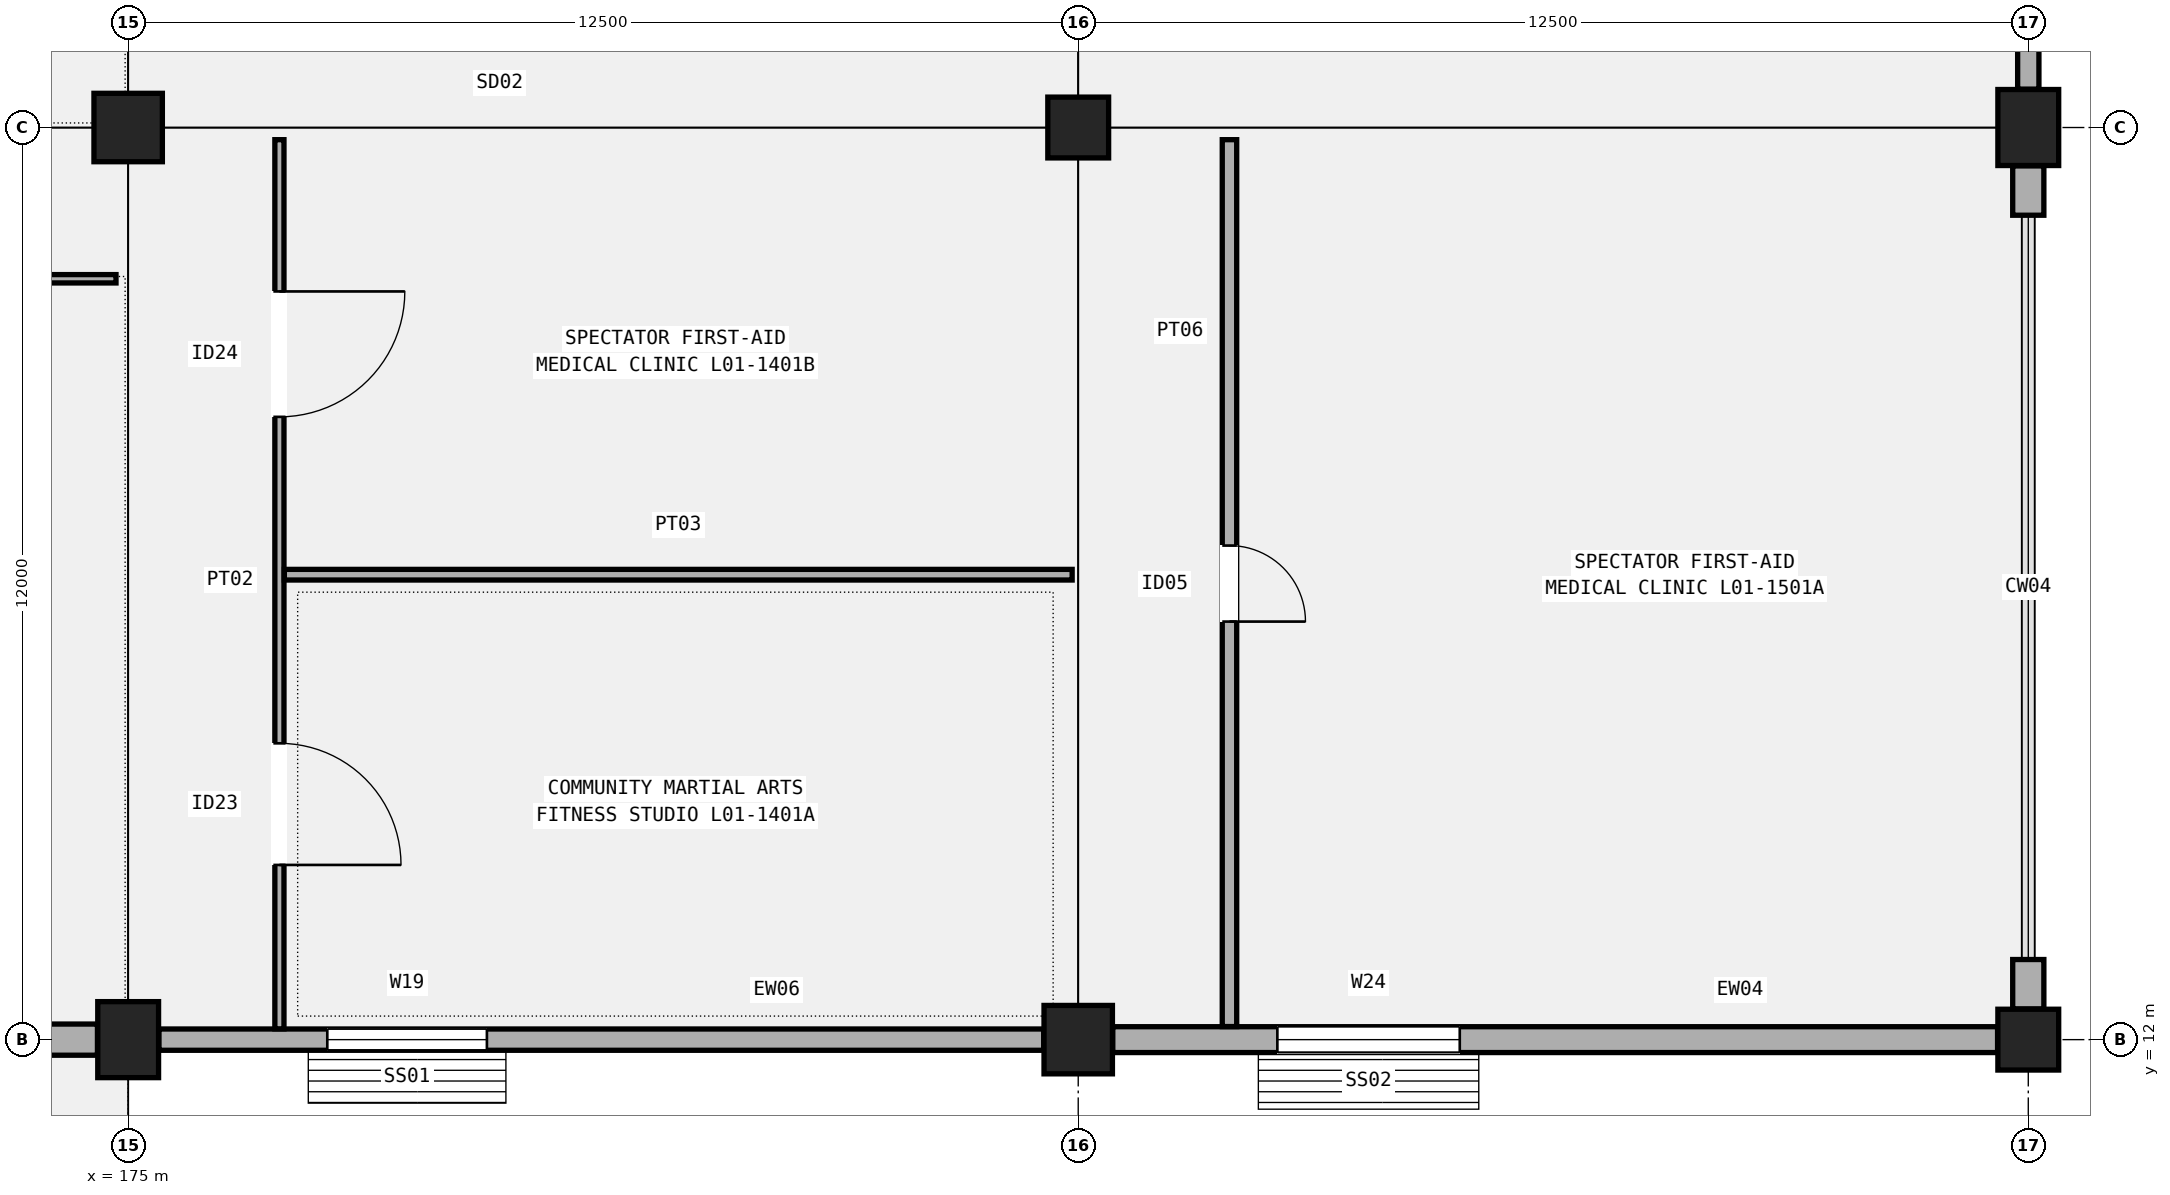
"""IFC4 building model, lengths in metres.
Left out: names, types, materials, properties, quantities, classifications, styles, units other than length and angle.
Written with IfcOpenShell. Run it as: python <this file> out.ifc"""

import sys

from ifc_helpers import new_model, si_unit, direction, frame, frame_2d, origin, origin_2d, place, context, subcontext, project, spatial, rectangle, extrude, element, fill, save


model = new_model("IFC4")
c1 = context("Model", 3, precision=1e-05, world=origin(), true_north=direction((0.0, 1.0)))
c2 = subcontext(c1, "Body", "Model", "MODEL_VIEW")
j1 = project(units=[si_unit("LENGTHUNIT", "METRE"), si_unit("PLANEANGLEUNIT", "RADIAN")], contexts=[c1])
p1 = place(None, origin())
s1 = spatial("IfcSite", under=j1, at=p1, CompositionType="ELEMENT")
p2 = place(p1, origin())
s2 = spatial("IfcBuilding", under=s1, at=p2, CompositionType="ELEMENT")
p3 = place(p2, frame((0.0, 0.0, 5.4)))
s3 = spatial("IfcBuildingStorey", under=s2, at=p3, CompositionType="ELEMENT", Elevation=5.4)
p4 = place(p3, frame((175.0, 12.0, 0.0), z_axis=(0.0, 0.0, 1.0), x_axis=(1.0, 0.0, 0.0)))
e1 = element("IfcColumn", 1, at=p4, inside=s3, PredefinedType="COLUMN", context=c2, shape_type="SweptSolid", body=[
    extrude(rectangle(XDim=0.8, YDim=1.0, at=origin_2d()), origin(), (0.0, 0.0, 1.0), 4.8),
])
for number, where, z_axis, x_axis in (
    (2, (175.0, 24.0, 0.0), (0.0, 0.0, 1.0), (1.0, 0.0, 0.0)),
    (3, (187.5, 12.0, 0.0), (0.0, 0.0, 1.0), (1.0, 0.0, 0.0)),
):
    element("IfcColumn", number, at=place(p3, frame(where, z_axis=z_axis, x_axis=x_axis)), inside=s3, PredefinedType="COLUMN", context=c2, shape_type="SweptSolid", body=[
        extrude(rectangle(XDim=0.9, YDim=0.9, at=origin_2d()), origin(), (0.0, 0.0, 1.0), 4.8),
    ])
for number, where, z_axis, x_axis in (
    (4, (187.5, 24.0, 0.0), (0.0, 0.0, 1.0), (1.0, 0.0, 0.0)),
    (5, (200.0, 12.0, 0.0), (0.0, 0.0, 1.0), (1.0, 0.0, 0.0)),
):
    element("IfcColumn", number, at=place(p3, frame(where, z_axis=z_axis, x_axis=x_axis)), inside=s3, PredefinedType="COLUMN", context=c2, shape_type="SweptSolid", body=[
        extrude(rectangle(XDim=0.8, YDim=0.8, at=origin_2d()), origin(), (0.0, 0.0, 1.0), 4.8),
    ])
p5 = place(p3, frame((200.0, 24.0, 0.0), z_axis=(0.0, 0.0, 1.0), x_axis=(1.0, 0.0, 0.0)))
e6 = element("IfcColumn", 6, at=p5, inside=s3, PredefinedType="COLUMN", context=c2, shape_type="SweptSolid", body=[
    extrude(rectangle(XDim=0.8, YDim=1.0, at=origin_2d()), origin(), (0.0, 0.0, 1.0), 4.8),
])
p6 = place(p3, frame((173.946, 12.0, 0.0), z_axis=(0.0, 0.0, 1.0), x_axis=(1.0, 0.0, 0.0)))
e7 = element("IfcWall", 7, at=p6, inside=s3, PredefinedType="SOLIDWALL", context=c2, shape_type="SweptSolid", body=[
    extrude(rectangle(XDim=0.65, YDim=0.41, at=frame_2d((0.325, 0.0))), origin(), (0.0, 0.0, 1.0), 4.15),
])
p7 = place(p3, frame((175.404, 12.0, 0.0), z_axis=(0.0, 0.0, 1.0), x_axis=(1.0, 0.0, 0.0)))
e8 = element("IfcWall", 8, at=p7, inside=s3, PredefinedType="SOLIDWALL", context=c2, shape_type="SweptSolid", body=[
    extrude(rectangle(XDim=11.642, YDim=0.28, at=frame_2d((5.821, 0.0))), origin(), (0.0, 0.0, 1.0), 4.2),
])
p8 = place(p7, frame((2.216, 0.0, 0.95)))
e9 = element("IfcOpeningElement", 9, at=p8, cuts=e8, PredefinedType="OPENING", context=c2, shape_type="SweptSolid", body=[
    extrude(rectangle(XDim=2.1, YDim=2.25, at=frame_2d((1.05, 1.125))), frame((0.0, 0.15, 0.0), z_axis=(0.0, -1.0, 0.0), x_axis=(1.0, 0.0, 0.0)), (0.0, 0.0, 1.0), 0.3),
])
p9 = place(p3, frame((187.954, 12.0, 0.0), z_axis=(0.0, 0.0, 1.0), x_axis=(1.0, 0.0, 0.0)))
e10 = element("IfcWall", 10, at=p9, inside=s3, PredefinedType="SOLIDWALL", context=c2, shape_type="SweptSolid", body=[
    extrude(rectangle(XDim=11.642, YDim=0.34, at=frame_2d((5.821, 0.0))), origin(), (0.0, 0.0, 1.0), 4.15),
])
p10 = place(p9, frame((2.166, 0.0, 0.95)))
e11 = element("IfcOpeningElement", 11, at=p10, cuts=e10, PredefinedType="OPENING", context=c2, shape_type="SweptSolid", body=[
    extrude(rectangle(XDim=2.4, YDim=2.05, at=frame_2d((1.2, 1.025))), frame((0.0, 0.18, 0.0), z_axis=(0.0, -1.0, 0.0), x_axis=(1.0, 0.0, 0.0)), (0.0, 0.0, 1.0), 0.36),
])
p11 = place(p3, frame((200.0, 12.404, 0.0), z_axis=(0.0, 0.0, 1.0), x_axis=(0.0, 1.0, 0.0)))
e12 = element("IfcWall", 12, at=p11, inside=s3, PredefinedType="SOLIDWALL", context=c2, shape_type="SweptSolid", body=[
    extrude(rectangle(XDim=0.65, YDim=0.41, at=frame_2d((0.325, 0.0))), origin(), (0.0, 0.0, 1.0), 4.2),
])
p12 = place(p3, frame((200.0, 22.846, 0.0), z_axis=(0.0, 0.0, 1.0), x_axis=(0.0, 1.0, 0.0)))
e13 = element("IfcWall", 13, at=p12, inside=s3, PredefinedType="SOLIDWALL", context=c2, shape_type="SweptSolid", body=[
    extrude(rectangle(XDim=0.65, YDim=0.41, at=frame_2d((0.325, 0.0))), origin(), (0.0, 0.0, 1.0), 4.2),
])
p13 = place(p3, frame((200.0, 24.504, 0.0), z_axis=(0.0, 0.0, 1.0), x_axis=(0.0, 1.0, 0.0)))
e14 = element("IfcWall", 14, at=p13, inside=s3, PredefinedType="SOLIDWALL", context=c2, shape_type="SweptSolid", body=[
    extrude(rectangle(XDim=11.042, YDim=0.28, at=frame_2d((5.521, 0.0))), origin(), (0.0, 0.0, 1.0), 4.15),
])
p14 = place(p13, frame((1.5, 0.0, 0.95)))
e15 = element("IfcOpeningElement", 15, at=p14, cuts=e14, PredefinedType="OPENING", context=c2, shape_type="SweptSolid", body=[
    extrude(rectangle(XDim=2.4, YDim=2.45, at=frame_2d((1.2, 1.225))), frame((0.0, 0.15, 0.0), z_axis=(0.0, -1.0, 0.0), x_axis=(1.0, 0.0, 0.0)), (0.0, 0.0, 1.0), 0.3),
])
p15 = place(p3, frame((162.66, 22.01, 0.0), z_axis=(0.0, 0.0, 1.0), x_axis=(1.0, 0.0, 0.0)))
e16 = element("IfcWall", 16, at=p15, inside=s3, PredefinedType="PARTITIONING", context=c2, shape_type="SweptSolid", body=[
    extrude(rectangle(XDim=12.18, YDim=0.11, at=frame_2d((6.09, 0.0))), origin(), (0.0, 0.0, 1.0), 3.92),
])
p16 = place(p15, frame((6.74, 0.0, 0.0), z_axis=(0.0, 0.0, 1.0), x_axis=(-1.0, 0.0, 0.0)))
e17 = element("IfcOpeningElement", 17, at=p16, cuts=e16, PredefinedType="OPENING", context=c2, shape_type="SweptSolid", body=[
    extrude(rectangle(XDim=1.3, YDim=2.24, at=frame_2d((0.65, 1.12))), frame((0.0, 0.065, 0.0), z_axis=(0.0, -1.0, 0.0), x_axis=(1.0, 0.0, 0.0)), (0.0, 0.0, 1.0), 0.13),
])
p17 = place(p3, frame((176.99, 12.142, 0.0), z_axis=(0.0, 0.0, 1.0), x_axis=(0.0, 1.0, 0.0)))
e18 = element("IfcWall", 18, at=p17, inside=s3, PredefinedType="PARTITIONING", context=c2, shape_type="SweptSolid", body=[
    extrude(rectangle(XDim=11.698, YDim=0.12, at=frame_2d((5.849, 0.0))), origin(), (0.0, 0.0, 1.0), 3.92),
])
p18 = place(p17, frame((3.757, 0.0, 0.0), z_axis=(0.0, 0.0, 1.0), x_axis=(-1.0, 0.0, 0.0)))
e19 = element("IfcOpeningElement", 19, at=p18, cuts=e18, PredefinedType="OPENING", context=c2, shape_type="SweptSolid", body=[
    extrude(rectangle(XDim=1.6, YDim=2.3, at=frame_2d((0.8, 1.15))), frame((0.0, 0.07, 0.0), z_axis=(0.0, -1.0, 0.0), x_axis=(1.0, 0.0, 0.0)), (0.0, 0.0, 1.0), 0.14),
])
p19 = place(p17, frame((9.701, 0.0, 0.0), z_axis=(0.0, 0.0, 1.0), x_axis=(-1.0, 0.0, 0.0)))
e20 = element("IfcOpeningElement", 20, at=p19, cuts=e18, PredefinedType="OPENING", context=c2, shape_type="SweptSolid", body=[
    extrude(rectangle(XDim=1.65, YDim=2.28, at=frame_2d((0.825, 1.14))), frame((0.0, 0.07, 0.0), z_axis=(0.0, -1.0, 0.0), x_axis=(1.0, 0.0, 0.0)), (0.0, 0.0, 1.0), 0.14),
])
p20 = place(p3, frame((177.055, 18.117, 0.0), z_axis=(0.0, 0.0, 1.0), x_axis=(1.0, 0.0, 0.0)))
e21 = element("IfcWall", 21, at=p20, inside=s3, PredefinedType="PARTITIONING", context=c2, shape_type="SweptSolid", body=[
    extrude(rectangle(XDim=10.365, YDim=0.14, at=frame_2d((5.183, 0.0))), origin(), (0.0, 0.0, 1.0), 3.92),
])
p21 = place(p3, frame((189.49, 12.172, 0.0), z_axis=(0.0, 0.0, 1.0), x_axis=(0.0, 1.0, 0.0)))
e22 = element("IfcWall", 22, at=p21, inside=s3, PredefinedType="PARTITIONING", context=c2, shape_type="SweptSolid", body=[
    extrude(rectangle(XDim=11.668, YDim=0.19, at=frame_2d((5.834, 0.0))), origin(), (0.0, 0.0, 1.0), 3.92),
])
p22 = place(p21, frame((6.328, 0.0, 0.0), z_axis=(0.0, 0.0, 1.0), x_axis=(-1.0, 0.0, 0.0)))
e23 = element("IfcOpeningElement", 23, at=p22, cuts=e22, PredefinedType="OPENING", context=c2, shape_type="SweptSolid", body=[
    extrude(rectangle(XDim=1.0, YDim=2.14, at=frame_2d((0.5, 1.07))), frame((0.0, 0.105, 0.0), z_axis=(0.0, -1.0, 0.0), x_axis=(1.0, 0.0, 0.0)), (0.0, 0.0, 1.0), 0.21),
])
p23 = place(p8, origin())
e24 = element("IfcWindow", 24, at=p23, inside=s3, PartitioningType="SINGLE_PANEL", PredefinedType="WINDOW", context=c2, shape_type="SweptSolid", body=[
    extrude(rectangle(XDim=2.1, YDim=2.25, at=frame_2d((1.05, 1.125))), frame((0.0, 0.03, 0.0), z_axis=(0.0, -1.0, 0.0), x_axis=(1.0, 0.0, 0.0)), (0.0, 0.0, 1.0), 0.06),
])
fill(e9, e24)
p24 = place(p10, origin())
e25 = element("IfcWindow", 25, at=p24, inside=s3, PartitioningType="SINGLE_PANEL", PredefinedType="WINDOW", context=c2, shape_type="SweptSolid", body=[
    extrude(rectangle(XDim=2.4, YDim=2.05, at=frame_2d((1.2, 1.025))), frame((0.0, 0.03, 0.0), z_axis=(0.0, -1.0, 0.0), x_axis=(1.0, 0.0, 0.0)), (0.0, 0.0, 1.0), 0.06),
])
fill(e11, e25)
p25 = place(p18, origin())
e26 = element("IfcDoor", 26, at=p25, inside=s3, OperationType="SINGLE_SWING_RIGHT", PredefinedType="DOOR", context=c2, shape_type="SweptSolid", body=[
    extrude(rectangle(XDim=1.6, YDim=2.3, at=frame_2d((0.8, 1.15))), frame((0.0, 0.025, 0.0), z_axis=(0.0, -1.0, 0.0), x_axis=(1.0, 0.0, 0.0)), (0.0, 0.0, 1.0), 0.05),
])
fill(e19, e26)
p26 = place(p19, origin())
e27 = element("IfcDoor", 27, at=p26, inside=s3, OperationType="SINGLE_SWING_LEFT", PredefinedType="DOOR", context=c2, shape_type="SweptSolid", body=[
    extrude(rectangle(XDim=1.65, YDim=2.28, at=frame_2d((0.825, 1.14))), frame((0.0, 0.025, 0.0), z_axis=(0.0, -1.0, 0.0), x_axis=(1.0, 0.0, 0.0)), (0.0, 0.0, 1.0), 0.05),
])
fill(e20, e27)
p27 = place(p22, origin())
e28 = element("IfcDoor", 28, at=p27, inside=s3, OperationType="SINGLE_SWING_RIGHT", PredefinedType="DOOR", context=c2, shape_type="SweptSolid", body=[
    extrude(rectangle(XDim=1.0, YDim=2.14, at=frame_2d((0.5, 1.07))), frame((0.0, 0.025, 0.0), z_axis=(0.0, -1.0, 0.0), x_axis=(1.0, 0.0, 0.0)), (0.0, 0.0, 1.0), 0.05),
])
fill(e23, e28)
save(model, sys.argv[1])
